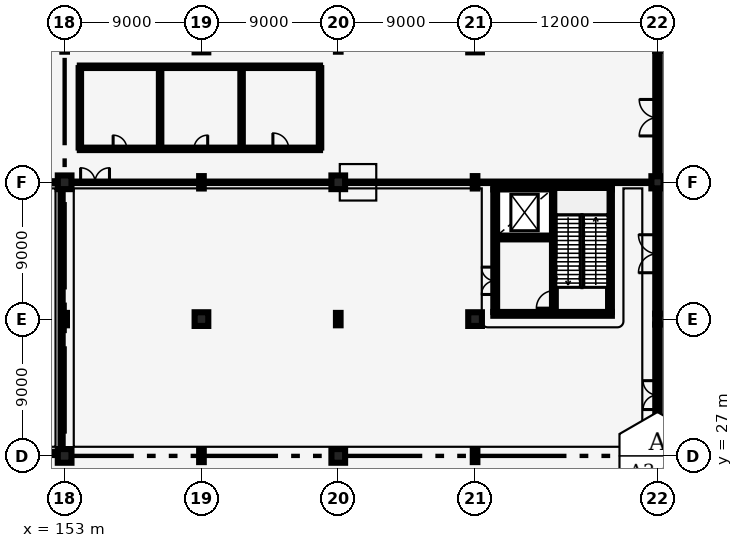
"""IFC4 building model, lengths in metres.
Left out: names, types, materials, properties, quantities, classifications, styles, units other than length and angle.
Written with IfcOpenShell. Run it as: python <this file> out.ifc"""

import sys

from ifc_helpers import new_model, si_unit, direction, frame, frame_2d, origin, origin_2d, place, context, subcontext, project, spatial, rectangle, i_section, extrude, element, fill, save


model = new_model("IFC4")
c1 = context("Model", 3, precision=1e-05, world=origin(), true_north=direction((0.0, 1.0)))
c2 = subcontext(c1, "Body", "Model", "MODEL_VIEW")
j1 = project(units=[si_unit("LENGTHUNIT", "METRE"), si_unit("PLANEANGLEUNIT", "RADIAN")], contexts=[c1])
p1 = place(None, origin())
s1 = spatial("IfcSite", under=j1, at=p1, CompositionType="ELEMENT")
p2 = place(p1, origin())
s2 = spatial("IfcBuilding", under=s1, at=p2, CompositionType="ELEMENT")
p3 = place(p2, origin())
s3 = spatial("IfcBuildingStorey", under=s2, at=p3, CompositionType="ELEMENT", Elevation=0.0)
p4 = place(p3, frame((153.0, 27.0, 0.0), z_axis=(0.0, 0.0, 1.0), x_axis=(1.0, 0.0, 0.0)))
e1 = element("IfcColumn", 1, at=p4, inside=s3, PredefinedType="COLUMN", context=c2, shape_type="SweptSolid", body=[
    extrude(rectangle(XDim=0.9, YDim=0.9, at=origin_2d()), origin(), (0.0, 0.0, 1.0), 6.0),
])
p5 = place(p3, frame((153.0, 36.0, 0.0), z_axis=(0.0, 0.0, 1.0), x_axis=(1.0, 0.0, 0.0)))
e2 = element("IfcColumn", 2, at=p5, inside=s3, PredefinedType="COLUMN", context=c2, shape_type="SweptSolid", body=[
    extrude(i_section(OverallWidth=0.303, OverallDepth=0.814, WebThickness=0.021, FlangeThickness=0.04, FilletRadius=0.03, at=origin_2d()), origin(), (0.0, 0.0, 1.0), 6.0),
])
p6 = place(p3, frame((153.0, 45.0, 0.0), z_axis=(0.0, 0.0, 1.0), x_axis=(1.0, 0.0, 0.0)))
e3 = element("IfcColumn", 3, at=p6, inside=s3, PredefinedType="COLUMN", context=c2, shape_type="SweptSolid", body=[
    extrude(rectangle(XDim=0.9, YDim=0.9, at=origin_2d()), origin(), (0.0, 0.0, 1.0), 6.0),
])
for number, where, z_axis, x_axis in (
    (4, (153.0, 54.0, 0.0), (0.0, 0.0, 1.0), (1.0, 0.0, 0.0)),
    (5, (162.0, 27.0, 0.0), (0.0, 0.0, 1.0), (1.0, 0.0, 0.0)),
):
    element("IfcColumn", number, at=place(p3, frame(where, z_axis=z_axis, x_axis=x_axis)), inside=s3, PredefinedType="COLUMN", context=c2, shape_type="SweptSolid", body=[
        extrude(i_section(OverallWidth=0.303, OverallDepth=0.814, WebThickness=0.021, FlangeThickness=0.04, FilletRadius=0.03, at=origin_2d()), origin(), (0.0, 0.0, 1.0), 6.0),
    ])
p7 = place(p3, frame((162.0, 36.0, 0.0), z_axis=(0.0, 0.0, 1.0), x_axis=(1.0, 0.0, 0.0)))
e6 = element("IfcColumn", 6, at=p7, inside=s3, PredefinedType="COLUMN", context=c2, shape_type="SweptSolid", body=[
    extrude(rectangle(XDim=0.9, YDim=0.9, at=origin_2d()), origin(), (0.0, 0.0, 1.0), 6.0),
])
p8 = place(p3, frame((162.0, 45.0, 0.0), z_axis=(0.0, 0.0, 1.0), x_axis=(1.0, 0.0, 0.0)))
e7 = element("IfcColumn", 7, at=p8, inside=s3, PredefinedType="COLUMN", context=c2, shape_type="SweptSolid", body=[
    extrude(i_section(OverallWidth=0.303, OverallDepth=0.814, WebThickness=0.021, FlangeThickness=0.04, FilletRadius=0.03, at=origin_2d()), origin(), (0.0, 0.0, 1.0), 6.0),
])
for number, where, z_axis, x_axis in (
    (8, (162.0, 54.0, 0.0), (0.0, 0.0, 1.0), (1.0, 0.0, 0.0)),
    (9, (171.0, 27.0, 0.0), (0.0, 0.0, 1.0), (1.0, 0.0, 0.0)),
):
    element("IfcColumn", number, at=place(p3, frame(where, z_axis=z_axis, x_axis=x_axis)), inside=s3, PredefinedType="COLUMN", context=c2, shape_type="SweptSolid", body=[
        extrude(rectangle(XDim=0.9, YDim=0.9, at=origin_2d()), origin(), (0.0, 0.0, 1.0), 6.0),
    ])
p9 = place(p3, frame((171.0, 36.0, 0.0), z_axis=(0.0, 0.0, 1.0), x_axis=(1.0, 0.0, 0.0)))
e10 = element("IfcColumn", 10, at=p9, inside=s3, PredefinedType="COLUMN", context=c2, shape_type="SweptSolid", body=[
    extrude(i_section(OverallWidth=0.303, OverallDepth=0.814, WebThickness=0.021, FlangeThickness=0.04, FilletRadius=0.03, at=origin_2d()), origin(), (0.0, 0.0, 1.0), 6.0),
])
p10 = place(p3, frame((171.0, 45.0, 0.0), z_axis=(0.0, 0.0, 1.0), x_axis=(1.0, 0.0, 0.0)))
e11 = element("IfcColumn", 11, at=p10, inside=s3, PredefinedType="COLUMN", context=c2, shape_type="SweptSolid", body=[
    extrude(rectangle(XDim=0.9, YDim=0.9, at=origin_2d()), origin(), (0.0, 0.0, 1.0), 6.0),
])
for number, where, z_axis, x_axis in (
    (12, (171.0, 54.0, 0.0), (0.0, 0.0, 1.0), (1.0, 0.0, 0.0)),
    (13, (180.0, 27.0, 0.0), (0.0, 0.0, 1.0), (1.0, 0.0, 0.0)),
):
    element("IfcColumn", number, at=place(p3, frame(where, z_axis=z_axis, x_axis=x_axis)), inside=s3, PredefinedType="COLUMN", context=c2, shape_type="SweptSolid", body=[
        extrude(i_section(OverallWidth=0.303, OverallDepth=0.814, WebThickness=0.021, FlangeThickness=0.04, FilletRadius=0.03, at=origin_2d()), origin(), (0.0, 0.0, 1.0), 6.0),
    ])
p11 = place(p3, frame((180.0, 36.0, 0.0), z_axis=(0.0, 0.0, 1.0), x_axis=(1.0, 0.0, 0.0)))
e14 = element("IfcColumn", 14, at=p11, inside=s3, PredefinedType="COLUMN", context=c2, shape_type="SweptSolid", body=[
    extrude(rectangle(XDim=0.9, YDim=0.9, at=origin_2d()), origin(), (0.0, 0.0, 1.0), 6.0),
])
p12 = place(p3, frame((180.0, 45.0, 0.0), z_axis=(0.0, 0.0, 1.0), x_axis=(1.0, 0.0, 0.0)))
e15 = element("IfcColumn", 15, at=p12, inside=s3, PredefinedType="COLUMN", context=c2, shape_type="SweptSolid", body=[
    extrude(i_section(OverallWidth=0.303, OverallDepth=0.814, WebThickness=0.021, FlangeThickness=0.04, FilletRadius=0.03, at=origin_2d()), origin(), (0.0, 0.0, 1.0), 6.0),
])
p13 = place(p3, frame((180.0, 54.0, 0.0), z_axis=(0.0, 0.0, 1.0), x_axis=(1.0, 0.0, 0.0)))
e16 = element("IfcColumn", 16, at=p13, inside=s3, PredefinedType="COLUMN", context=c2, shape_type="SweptSolid", body=[
    extrude(rectangle(XDim=0.9, YDim=0.9, at=origin_2d()), origin(), (0.0, 0.0, 1.0), 6.0),
])
p14 = place(p3, frame((192.0, 27.0, 0.0), z_axis=(0.0, 0.0, 1.0), x_axis=(1.0, 0.0, 0.0)))
e17 = element("IfcColumn", 17, at=p14, inside=s3, PredefinedType="COLUMN", context=c2, shape_type="SweptSolid", body=[
    extrude(rectangle(XDim=0.8, YDim=0.8, at=origin_2d()), origin(), (0.0, 0.0, 1.0), 6.0),
])
p15 = place(p3, frame((192.0, 36.0, 0.0), z_axis=(0.0, 0.0, 1.0), x_axis=(1.0, 0.0, 0.0)))
e18 = element("IfcColumn", 18, at=p15, inside=s3, PredefinedType="COLUMN", context=c2, shape_type="SweptSolid", body=[
    extrude(i_section(OverallWidth=0.304, OverallDepth=0.716, WebThickness=0.021, FlangeThickness=0.04, FilletRadius=0.027, at=origin_2d()), origin(), (0.0, 0.0, 1.0), 6.0),
])
p16 = place(p3, frame((192.0, 45.0, 0.0), z_axis=(0.0, 0.0, 1.0), x_axis=(1.0, 0.0, 0.0)))
e19 = element("IfcColumn", 19, at=p16, inside=s3, PredefinedType="COLUMN", context=c2, shape_type="SweptSolid", body=[
    extrude(rectangle(XDim=0.8, YDim=0.8, at=origin_2d()), origin(), (0.0, 0.0, 1.0), 6.0),
])
p17 = place(p3, frame((192.0, 18.353, 0.0), z_axis=(0.0, 0.0, 1.0), x_axis=(0.0, 1.0, 0.0)))
e20 = element("IfcWall", 20, at=p17, inside=s3, PredefinedType="SOLIDWALL", context=c2, shape_type="SweptSolid", body=[
    extrude(rectangle(XDim=8.252, YDim=0.29, at=frame_2d((4.126, 0.0))), origin(), (0.0, 0.0, 1.0), 4.95),
])
p18 = place(p17, frame((2.697, 0.0, 0.0)))
e21 = element("IfcOpeningElement", 21, at=p18, cuts=e20, PredefinedType="OPENING", context=c2, shape_type="SweptSolid", body=[
    extrude(rectangle(XDim=2.0, YDim=2.25, at=frame_2d((1.0, 1.125))), frame((0.0, 0.155, 0.0), z_axis=(0.0, -1.0, 0.0), x_axis=(1.0, 0.0, 0.0)), (0.0, 0.0, 1.0), 0.31),
])
p19 = place(p3, frame((192.0, 27.395, 0.0), z_axis=(0.0, 0.0, 1.0), x_axis=(0.0, 1.0, 0.0)))
e22 = element("IfcWall", 22, at=p19, inside=s3, PredefinedType="SOLIDWALL", context=c2, shape_type="SweptSolid", body=[
    extrude(rectangle(XDim=8.252, YDim=0.29, at=frame_2d((4.126, 0.0))), origin(), (0.0, 0.0, 1.0), 4.95),
])
p20 = place(p19, frame((2.655, 0.0, 0.0)))
e23 = element("IfcOpeningElement", 23, at=p20, cuts=e22, PredefinedType="OPENING", context=c2, shape_type="SweptSolid", body=[
    extrude(rectangle(XDim=1.9, YDim=2.2, at=frame_2d((0.95, 1.1))), frame((0.0, 0.155, 0.0), z_axis=(0.0, -1.0, 0.0), x_axis=(1.0, 0.0, 0.0)), (0.0, 0.0, 1.0), 0.31),
])
p21 = place(p3, frame((192.0, 36.353, 0.0), z_axis=(0.0, 0.0, 1.0), x_axis=(0.0, 1.0, 0.0)))
e24 = element("IfcWall", 24, at=p21, inside=s3, PredefinedType="SOLIDWALL", context=c2, shape_type="SweptSolid", body=[
    extrude(rectangle(XDim=8.252, YDim=0.29, at=frame_2d((4.126, 0.0))), origin(), (0.0, 0.0, 1.0), 4.95),
])
p22 = place(p21, frame((2.697, 0.0, 0.0)))
e25 = element("IfcOpeningElement", 25, at=p22, cuts=e24, PredefinedType="OPENING", context=c2, shape_type="SweptSolid", body=[
    extrude(rectangle(XDim=2.5, YDim=2.5, at=frame_2d((1.25, 1.25))), frame((0.0, 0.155, 0.0), z_axis=(0.0, -1.0, 0.0), x_axis=(1.0, 0.0, 0.0)), (0.0, 0.0, 1.0), 0.31),
])
p23 = place(p3, frame((192.0, 45.395, 0.0), z_axis=(0.0, 0.0, 1.0), x_axis=(0.0, 1.0, 0.0)))
e26 = element("IfcWall", 26, at=p23, inside=s3, PredefinedType="SOLIDWALL", context=c2, shape_type="SweptSolid", body=[
    extrude(rectangle(XDim=8.252, YDim=0.29, at=frame_2d((4.126, 0.0))), origin(), (0.0, 0.0, 1.0), 4.95),
])
p24 = place(p23, frame((2.655, 0.0, 0.0)))
e27 = element("IfcOpeningElement", 27, at=p24, cuts=e26, PredefinedType="OPENING", context=c2, shape_type="SweptSolid", body=[
    extrude(rectangle(XDim=2.4, YDim=2.45, at=frame_2d((1.2, 1.225))), frame((0.0, 0.155, 0.0), z_axis=(0.0, -1.0, 0.0), x_axis=(1.0, 0.0, 0.0)), (0.0, 0.0, 1.0), 0.31),
])
p25 = place(p3, frame((181.325, 36.47, 0.0), z_axis=(0.0, 0.0, 1.0), x_axis=(0.0, 1.0, 0.0)))
e28 = element("IfcWall", 28, at=p25, inside=s3, PredefinedType="SHEAR", context=c2, shape_type="SweptSolid", body=[
    extrude(rectangle(XDim=8.06, YDim=0.25, at=frame_2d((4.03, 0.0))), origin(), (0.0, 0.0, 1.0), 5.64),
])
p26 = place(p25, frame((1.15, 0.0, 0.0)))
e29 = element("IfcOpeningElement", 29, at=p26, cuts=e28, PredefinedType="OPENING", context=c2, shape_type="SweptSolid", body=[
    extrude(rectangle(XDim=1.8, YDim=2.2, at=frame_2d((0.9, 1.1))), frame((0.0, 0.135, 0.0), z_axis=(0.0, -1.0, 0.0), x_axis=(1.0, 0.0, 0.0)), (0.0, 0.0, 1.0), 0.27),
])
p27 = place(p3, frame((188.875, 36.47, 0.0), z_axis=(0.0, 0.0, 1.0), x_axis=(0.0, 1.0, 0.0)))
e30 = element("IfcWall", 30, at=p27, inside=s3, PredefinedType="SHEAR", context=c2, shape_type="SweptSolid", body=[
    extrude(rectangle(XDim=8.06, YDim=0.25, at=frame_2d((4.03, 0.0))), origin(), (0.0, 0.0, 1.0), 5.64),
])
for number, where, z_axis, x_axis in (
    (31, (181.2, 36.345, 0.0), (0.0, 0.0, 1.0), (1.0, 0.0, 0.0)),
    (32, (181.2, 44.655, 0.0), (0.0, 0.0, 1.0), (1.0, 0.0, 0.0)),
):
    element("IfcWall", number, at=place(p3, frame(where, z_axis=z_axis, x_axis=x_axis)), inside=s3, PredefinedType="SHEAR", context=c2, shape_type="SweptSolid", body=[
        extrude(rectangle(XDim=7.8, YDim=0.25, at=frame_2d((3.9, 0.0))), origin(), (0.0, 0.0, 1.0), 5.64),
    ])
p28 = place(p3, frame((185.185, 36.47, 0.0), z_axis=(0.0, 0.0, 1.0), x_axis=(0.0, 1.0, 0.0)))
e33 = element("IfcWall", 33, at=p28, inside=s3, PredefinedType="SHEAR", context=c2, shape_type="SweptSolid", body=[
    extrude(rectangle(XDim=8.06, YDim=0.25, at=frame_2d((4.03, 0.0))), origin(), (0.0, 0.0, 1.0), 5.64),
])
p29 = place(p28, frame((0.25, 0.0, 0.0)))
e34 = element("IfcOpeningElement", 34, at=p29, cuts=e33, PredefinedType="OPENING", context=c2, shape_type="SweptSolid", body=[
    extrude(rectangle(XDim=1.15, YDim=2.15, at=frame_2d((0.575, 1.075))), frame((0.0, 0.135, 0.0), z_axis=(0.0, -1.0, 0.0), x_axis=(1.0, 0.0, 0.0)), (0.0, 0.0, 1.0), 0.27),
])
p30 = place(p3, frame((181.45, 41.37, 0.0), z_axis=(0.0, 0.0, 1.0), x_axis=(1.0, 0.0, 0.0)))
e35 = element("IfcWall", 35, at=p30, inside=s3, PredefinedType="SHEAR", context=c2, shape_type="SweptSolid", body=[
    extrude(rectangle(XDim=3.61, YDim=0.25, at=frame_2d((1.805, 0.0))), origin(), (0.0, 0.0, 1.0), 5.64),
])
p31 = place(p30, frame((0.95, 0.0, 0.0)))
e36 = element("IfcOpeningElement", 36, at=p31, cuts=e35, PredefinedType="OPENING", context=c2, shape_type="SweptSolid", body=[
    extrude(rectangle(XDim=1.2, YDim=2.2, at=frame_2d((0.6, 1.1))), frame((0.0, 0.135, 0.0), z_axis=(0.0, -1.0, 0.0), x_axis=(1.0, 0.0, 0.0)), (0.0, 0.0, 1.0), 0.27),
])
p32 = place(p3, frame((154.0, 47.2, 0.0), z_axis=(0.0, 0.0, 1.0), x_axis=(1.0, 0.0, 0.0)))
e37 = element("IfcWall", 37, at=p32, inside=s3, PredefinedType="PLUMBINGWALL", context=c2, shape_type="SweptSolid", body=[
    extrude(rectangle(XDim=15.8, YDim=0.16, at=frame_2d((7.9, 0.0))), origin(), (0.0, 0.0, 1.0), 4.85),
])
p33 = place(p32, frame((2.19, 0.0, 0.0)))
e38 = element("IfcOpeningElement", 38, at=p33, cuts=e37, PredefinedType="OPENING", context=c2, shape_type="SweptSolid", body=[
    extrude(rectangle(XDim=0.9, YDim=2.1, at=frame_2d((0.45, 1.05))), frame((0.0, 0.09, 0.0), z_axis=(0.0, -1.0, 0.0), x_axis=(1.0, 0.0, 0.0)), (0.0, 0.0, 1.0), 0.18),
])
p34 = place(p32, frame((7.51, 0.0, 0.0)))
e39 = element("IfcOpeningElement", 39, at=p34, cuts=e37, PredefinedType="OPENING", context=c2, shape_type="SweptSolid", body=[
    extrude(rectangle(XDim=0.9, YDim=2.1, at=frame_2d((0.45, 1.05))), frame((0.0, 0.09, 0.0), z_axis=(0.0, -1.0, 0.0), x_axis=(1.0, 0.0, 0.0)), (0.0, 0.0, 1.0), 0.18),
])
p35 = place(p32, frame((12.7, 0.0, 0.0)))
e40 = element("IfcOpeningElement", 40, at=p35, cuts=e37, PredefinedType="OPENING", context=c2, shape_type="SweptSolid", body=[
    extrude(rectangle(XDim=1.04, YDim=2.15, at=frame_2d((0.52, 1.075))), frame((0.0, 0.09, 0.0), z_axis=(0.0, -1.0, 0.0), x_axis=(1.0, 0.0, 0.0)), (0.0, 0.0, 1.0), 0.18),
])
p36 = place(p3, frame((154.0, 52.6, 0.0), z_axis=(0.0, 0.0, 1.0), x_axis=(1.0, 0.0, 0.0)))
e41 = element("IfcWall", 41, at=p36, inside=s3, PredefinedType="PLUMBINGWALL", context=c2, shape_type="SweptSolid", body=[
    extrude(rectangle(XDim=15.8, YDim=0.16, at=frame_2d((7.9, 0.0))), origin(), (0.0, 0.0, 1.0), 4.85),
])
for number, where, z_axis, x_axis in (
    (42, (154.0, 47.288, 0.0), (0.0, 0.0, 1.0), (0.0, 1.0, 0.0)),
    (43, (159.28, 47.288, 0.0), (0.0, 0.0, 1.0), (0.0, 1.0, 0.0)),
    (44, (164.64, 47.288, 0.0), (0.0, 0.0, 1.0), (0.0, 1.0, 0.0)),
    (45, (169.8, 47.288, 0.0), (0.0, 0.0, 1.0), (0.0, 1.0, 0.0)),
):
    element("IfcWall", number, at=place(p3, frame(where, z_axis=z_axis, x_axis=x_axis)), inside=s3, PredefinedType="PLUMBINGWALL", context=c2, shape_type="SweptSolid", body=[
        extrude(rectangle(XDim=5.224, YDim=0.16, at=frame_2d((2.612, 0.0))), origin(), (0.0, 0.0, 1.0), 4.85),
    ])
p37 = place(p3, frame((126.6, 27.2, 0.0), z_axis=(0.0, 0.0, 1.0), x_axis=(1.0, 0.0, 0.0)))
e46 = element("IfcWall", 46, at=p37, inside=s3, PredefinedType="PARTITIONING", context=c2, shape_type="SweptSolid", body=[
    extrude(rectangle(XDim=26.2, YDim=0.14, at=frame_2d((13.1, 0.0))), origin(), (0.0, 0.0, 1.0), 4.85),
])
p38 = place(p37, frame((0.25, 0.0, 0.0)))
e47 = element("IfcOpeningElement", 47, at=p38, cuts=e46, PredefinedType="OPENING", context=c2, shape_type="SweptSolid", body=[
    extrude(rectangle(XDim=2.0, YDim=2.45, at=frame_2d((1.0, 1.225))), frame((0.0, 0.08, 0.0), z_axis=(0.0, -1.0, 0.0), x_axis=(1.0, 0.0, 0.0)), (0.0, 0.0, 1.0), 0.16),
])
p39 = place(p3, frame((126.684, 45.0, 0.0), z_axis=(0.0, 0.0, 1.0), x_axis=(1.0, 0.0, 0.0)))
e48 = element("IfcWall", 48, at=p39, inside=s3, PredefinedType="PARTITIONING", context=c2, shape_type="SweptSolid", body=[
    extrude(rectangle(XDim=26.032, YDim=0.14, at=frame_2d((13.016, 0.0))), origin(), (0.0, 0.0, 1.0), 4.85),
])
p40 = place(p3, frame((152.8, 27.284, 0.0), z_axis=(0.0, 0.0, 1.0), x_axis=(0.0, 1.0, 0.0)))
e49 = element("IfcWall", 49, at=p40, inside=s3, PredefinedType="PARTITIONING", context=c2, shape_type="SweptSolid", body=[
    extrude(rectangle(XDim=17.632, YDim=0.14, at=frame_2d((8.816, 0.0))), origin(), (0.0, 0.0, 1.0), 4.85),
])
p41 = place(p3, frame((153.2, 45.0, 0.0), z_axis=(0.0, 0.0, 1.0), x_axis=(1.0, 0.0, 0.0)))
e50 = element("IfcWall", 50, at=p41, inside=s3, PredefinedType="PARTITIONING", context=c2, shape_type="SweptSolid", body=[
    extrude(rectangle(XDim=38.2, YDim=0.095, at=frame_2d((19.1, 0.0))), origin(), (0.0, 0.0, 1.0), 4.85),
])
p42 = place(p41, frame((0.85, 0.0, 0.0)))
e51 = element("IfcOpeningElement", 51, at=p42, cuts=e50, PredefinedType="OPENING", context=c2, shape_type="SweptSolid", body=[
    extrude(rectangle(XDim=1.9, YDim=2.4, at=frame_2d((0.95, 1.2))), frame((0.0, 0.057, 0.0), z_axis=(0.0, -1.0, 0.0), x_axis=(1.0, 0.0, 0.0)), (0.0, 0.0, 1.0), 0.115),
])
p43 = place(p20, origin())
e52 = element("IfcDoor", 52, at=p43, inside=s3, OperationType="DOUBLE_DOOR_SINGLE_SWING", PredefinedType="DOOR", context=c2, shape_type="SweptSolid", body=[
    extrude(rectangle(XDim=1.9, YDim=2.2, at=frame_2d((0.95, 1.1))), frame((0.0, 0.025, 0.0), z_axis=(0.0, -1.0, 0.0), x_axis=(1.0, 0.0, 0.0)), (0.0, 0.0, 1.0), 0.05),
])
fill(e23, e52)
p44 = place(p22, origin())
e53 = element("IfcDoor", 53, at=p44, inside=s3, OperationType="DOUBLE_DOOR_SINGLE_SWING", PredefinedType="DOOR", context=c2, shape_type="SweptSolid", body=[
    extrude(rectangle(XDim=2.5, YDim=2.5, at=frame_2d((1.25, 1.25))), frame((0.0, 0.025, 0.0), z_axis=(0.0, -1.0, 0.0), x_axis=(1.0, 0.0, 0.0)), (0.0, 0.0, 1.0), 0.05),
])
fill(e25, e53)
p45 = place(p24, origin())
e54 = element("IfcDoor", 54, at=p45, inside=s3, OperationType="DOUBLE_DOOR_SINGLE_SWING", PredefinedType="DOOR", context=c2, shape_type="SweptSolid", body=[
    extrude(rectangle(XDim=2.4, YDim=2.45, at=frame_2d((1.2, 1.225))), frame((0.0, 0.025, 0.0), z_axis=(0.0, -1.0, 0.0), x_axis=(1.0, 0.0, 0.0)), (0.0, 0.0, 1.0), 0.05),
])
fill(e27, e54)
p46 = place(p29, origin())
e55 = element("IfcDoor", 55, at=p46, inside=s3, OperationType="SINGLE_SWING_LEFT", PredefinedType="DOOR", context=c2, shape_type="SweptSolid", body=[
    extrude(rectangle(XDim=1.15, YDim=2.15, at=frame_2d((0.575, 1.075))), frame((0.0, 0.025, 0.0), z_axis=(0.0, -1.0, 0.0), x_axis=(1.0, 0.0, 0.0)), (0.0, 0.0, 1.0), 0.05),
])
fill(e34, e55)
p47 = place(p31, origin())
e56 = element("IfcDoor", 56, at=p47, inside=s3, OperationType="DOUBLE_DOOR_SLIDING", PredefinedType="DOOR", context=c2, shape_type="SweptSolid", body=[
    extrude(rectangle(XDim=1.2, YDim=2.2, at=frame_2d((0.6, 1.1))), frame((0.0, 0.025, 0.0), z_axis=(0.0, -1.0, 0.0), x_axis=(1.0, 0.0, 0.0)), (0.0, 0.0, 1.0), 0.05),
])
fill(e36, e56)
p48 = place(p26, origin())
e57 = element("IfcDoor", 57, at=p48, inside=s3, OperationType="DOUBLE_DOOR_SINGLE_SWING", PredefinedType="DOOR", context=c2, shape_type="SweptSolid", body=[
    extrude(rectangle(XDim=1.8, YDim=2.2, at=frame_2d((0.9, 1.1))), frame((0.0, 0.025, 0.0), z_axis=(0.0, -1.0, 0.0), x_axis=(1.0, 0.0, 0.0)), (0.0, 0.0, 1.0), 0.05),
])
fill(e29, e57)
p49 = place(p33, origin())
e58 = element("IfcDoor", 58, at=p49, inside=s3, OperationType="SINGLE_SWING_LEFT", PredefinedType="DOOR", context=c2, shape_type="SweptSolid", body=[
    extrude(rectangle(XDim=0.9, YDim=2.1, at=frame_2d((0.45, 1.05))), frame((0.0, 0.025, 0.0), z_axis=(0.0, -1.0, 0.0), x_axis=(1.0, 0.0, 0.0)), (0.0, 0.0, 1.0), 0.05),
])
fill(e38, e58)
p50 = place(p34, origin())
e59 = element("IfcDoor", 59, at=p50, inside=s3, OperationType="SINGLE_SWING_RIGHT", PredefinedType="DOOR", context=c2, shape_type="SweptSolid", body=[
    extrude(rectangle(XDim=0.9, YDim=2.1, at=frame_2d((0.45, 1.05))), frame((0.0, 0.025, 0.0), z_axis=(0.0, -1.0, 0.0), x_axis=(1.0, 0.0, 0.0)), (0.0, 0.0, 1.0), 0.05),
])
fill(e39, e59)
p51 = place(p35, origin())
e60 = element("IfcDoor", 60, at=p51, inside=s3, OperationType="SINGLE_SWING_LEFT", PredefinedType="DOOR", context=c2, shape_type="SweptSolid", body=[
    extrude(rectangle(XDim=1.04, YDim=2.15, at=frame_2d((0.52, 1.075))), frame((0.0, 0.025, 0.0), z_axis=(0.0, -1.0, 0.0), x_axis=(1.0, 0.0, 0.0)), (0.0, 0.0, 1.0), 0.05),
])
fill(e40, e60)
p52 = place(p42, origin())
e61 = element("IfcDoor", 61, at=p52, inside=s3, OperationType="DOUBLE_DOOR_SINGLE_SWING", PredefinedType="DOOR", context=c2, shape_type="SweptSolid", body=[
    extrude(rectangle(XDim=1.9, YDim=2.4, at=frame_2d((0.95, 1.2))), frame((0.0, 0.025, 0.0), z_axis=(0.0, -1.0, 0.0), x_axis=(1.0, 0.0, 0.0)), (0.0, 0.0, 1.0), 0.05),
])
fill(e51, e61)
save(model, sys.argv[1])
